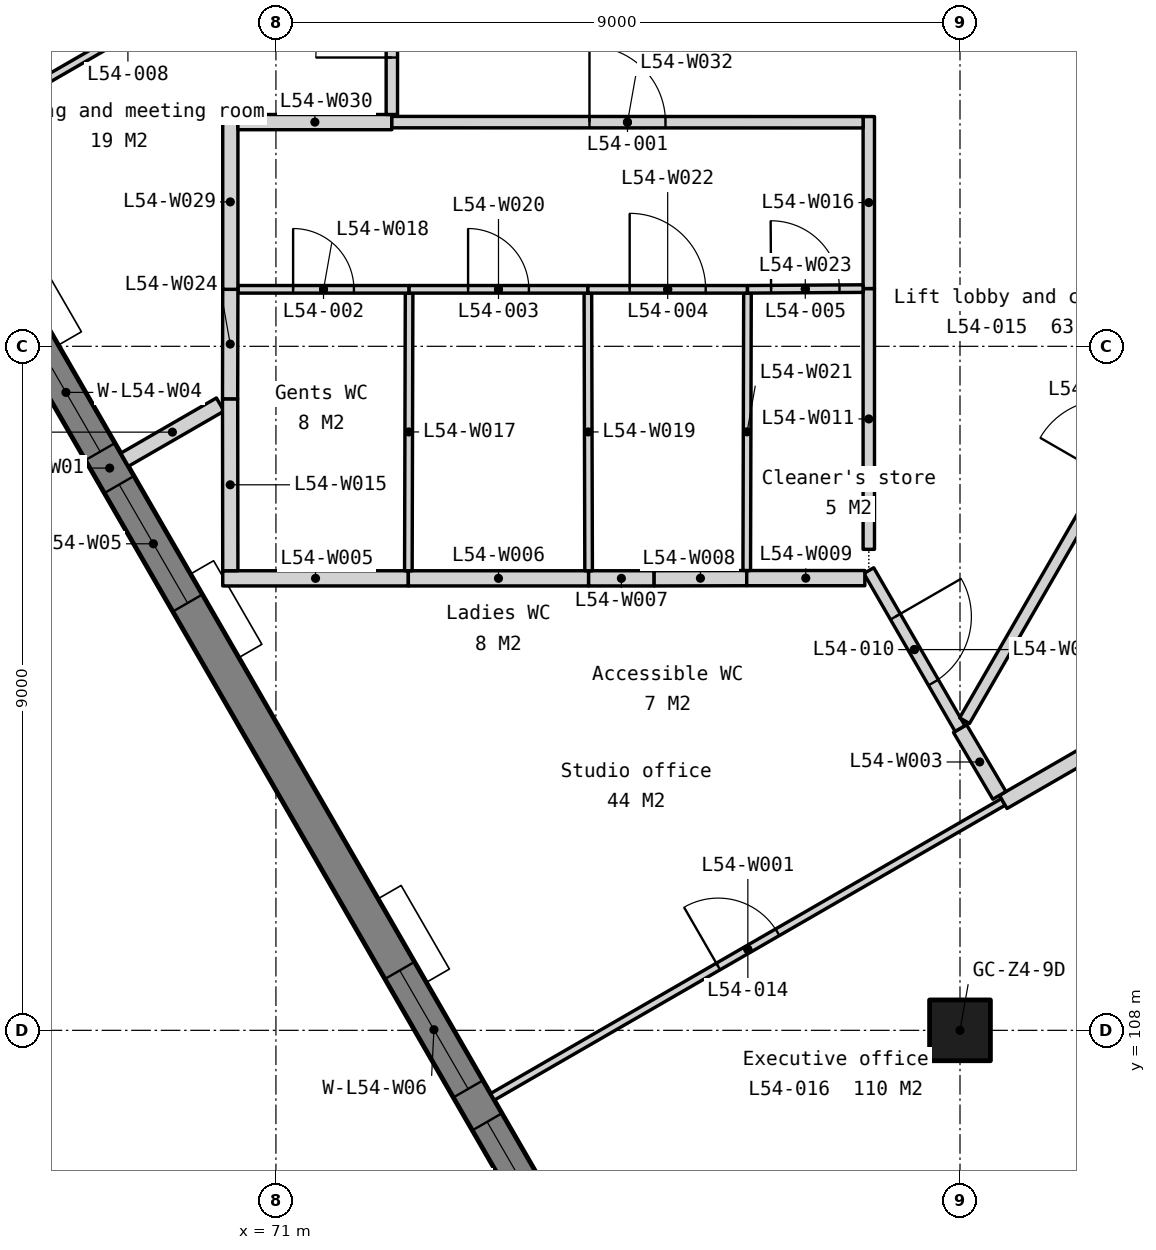
"""IFC4 building model, lengths in metres.
Left out: names, types, materials, properties, quantities, classifications, styles, units other than length and angle.
Written with IfcOpenShell. Run it as: python <this file> out.ifc"""

import sys

from ifc_helpers import new_model, si_unit, direction, frame, frame_2d, origin, origin_2d, place, context, subcontext, project, spatial, polyline, rectangle, outline, extrude, element, fill, save


model = new_model("IFC4")
c1 = context("Model", 3, precision=1e-05, world=origin(), true_north=direction((0.0, 1.0)))
c2 = subcontext(c1, "Body", "Model", "MODEL_VIEW")
j1 = project(units=[si_unit("LENGTHUNIT", "METRE"), si_unit("PLANEANGLEUNIT", "RADIAN")], contexts=[c1])
p1 = place(None, origin())
s1 = spatial("IfcSite", under=j1, at=p1, CompositionType="ELEMENT")
p2 = place(p1, origin())
s2 = spatial("IfcBuilding", under=s1, at=p2, CompositionType="ELEMENT")
p3 = place(p2, frame((0.0, 0.0, 215.3)))
s3 = spatial("IfcBuildingStorey", under=s2, at=p3, CompositionType="ELEMENT", Elevation=215.3)
p4 = place(p3, frame((80.0, 108.0, 0.0), z_axis=(0.0, 0.0, 1.0), x_axis=(1.0, 0.0, 0.0)))
e1 = element("IfcColumn", 1, at=p4, inside=s3, PredefinedType="COLUMN", context=c2, shape_type="SweptSolid", body=[
    extrude(rectangle(XDim=0.8, YDim=0.8, at=origin_2d()), origin(), (0.0, 0.0, 1.0), 3.9),
])
p5 = place(p3, frame((59.13, 132.168, -0.15), z_axis=(0.0, 0.0, 1.0), x_axis=(0.500002199942, -0.866024133644, 0.0)))
e2 = element("IfcWall", 2, at=p5, inside=s3, PredefinedType="SOLIDWALL", context=c2, shape_type="SweptSolid", body=[
    extrude(outline(polyline([(38.729, 0.0), (38.729, 3.9), (0.0, 3.9), (0.0, 0.0), (38.729, 0.0)])), frame((0.0, 0.225, 0.0), z_axis=(0.0, -1.0, 0.0), x_axis=(1.0, 0.0, 0.0)), (0.0, 0.0, 1.0), 0.45),
])
p6 = place(p5, frame((0.776, 0.0, 0.95)))
e3 = element("IfcOpeningElement", 3, at=p6, cuts=e2, PredefinedType="OPENING", context=c2, shape_type="SweptSolid", body=[
    extrude(rectangle(XDim=1.2, YDim=2.2, at=frame_2d((0.6, 1.1))), frame((0.0, 0.235, 0.0), z_axis=(0.0, -1.0, 0.0), x_axis=(1.0, 0.0, 0.0)), (0.0, 0.0, 1.0), 0.47),
])
p7 = place(p5, frame((7.632, 0.0, 0.95)))
e4 = element("IfcOpeningElement", 4, at=p7, cuts=e2, PredefinedType="OPENING", context=c2, shape_type="SweptSolid", body=[
    extrude(rectangle(XDim=1.8, YDim=2.2, at=frame_2d((0.9, 1.1))), frame((0.0, 0.235, 0.0), z_axis=(0.0, -1.0, 0.0), x_axis=(1.0, 0.0, 0.0)), (0.0, 0.0, 1.0), 0.47),
])
p8 = place(p5, frame((9.932, 0.0, 0.95)))
e5 = element("IfcOpeningElement", 5, at=p8, cuts=e2, PredefinedType="OPENING", context=c2, shape_type="SweptSolid", body=[
    extrude(rectangle(XDim=1.8, YDim=2.2, at=frame_2d((0.9, 1.1))), frame((0.0, 0.235, 0.0), z_axis=(0.0, -1.0, 0.0), x_axis=(1.0, 0.0, 0.0)), (0.0, 0.0, 1.0), 0.47),
])
p9 = place(p5, frame((17.315, 0.0, 0.95)))
e6 = element("IfcOpeningElement", 6, at=p9, cuts=e2, PredefinedType="OPENING", context=c2, shape_type="SweptSolid", body=[
    extrude(rectangle(XDim=1.8, YDim=2.2, at=frame_2d((0.9, 1.1))), frame((0.0, 0.235, 0.0), z_axis=(0.0, -1.0, 0.0), x_axis=(1.0, 0.0, 0.0)), (0.0, 0.0, 1.0), 0.47),
])
p10 = place(p5, frame((19.615, 0.0, 0.95)))
e7 = element("IfcOpeningElement", 7, at=p10, cuts=e2, PredefinedType="OPENING", context=c2, shape_type="SweptSolid", body=[
    extrude(rectangle(XDim=1.8, YDim=2.2, at=frame_2d((0.9, 1.1))), frame((0.0, 0.235, 0.0), z_axis=(0.0, -1.0, 0.0), x_axis=(1.0, 0.0, 0.0)), (0.0, 0.0, 1.0), 0.47),
])
p11 = place(p5, frame((26.997, 0.0, 0.95)))
e8 = element("IfcOpeningElement", 8, at=p11, cuts=e2, PredefinedType="OPENING", context=c2, shape_type="SweptSolid", body=[
    extrude(rectangle(XDim=1.8, YDim=2.2, at=frame_2d((0.9, 1.1))), frame((0.0, 0.235, 0.0), z_axis=(0.0, -1.0, 0.0), x_axis=(1.0, 0.0, 0.0)), (0.0, 0.0, 1.0), 0.47),
])
p12 = place(p5, frame((29.297, 0.0, 0.95)))
e9 = element("IfcOpeningElement", 9, at=p12, cuts=e2, PredefinedType="OPENING", context=c2, shape_type="SweptSolid", body=[
    extrude(rectangle(XDim=1.8, YDim=2.2, at=frame_2d((0.9, 1.1))), frame((0.0, 0.235, 0.0), z_axis=(0.0, -1.0, 0.0), x_axis=(1.0, 0.0, 0.0)), (0.0, 0.0, 1.0), 0.47),
])
p13 = place(p5, frame((36.753, 0.0, 0.95)))
e10 = element("IfcOpeningElement", 10, at=p13, cuts=e2, PredefinedType="OPENING", context=c2, shape_type="SweptSolid", body=[
    extrude(rectangle(XDim=1.2, YDim=2.2, at=frame_2d((0.6, 1.1))), frame((0.0, 0.235, 0.0), z_axis=(0.0, -1.0, 0.0), x_axis=(1.0, 0.0, 0.0)), (0.0, 0.0, 1.0), 0.47),
])
p14 = place(p3, frame((73.849, 107.125, 0.0), z_axis=(0.0, 0.0, 1.0), x_axis=(0.866027358884, 0.499996613652, 0.0)))
e11 = element("IfcWall", 11, at=p14, inside=s3, PredefinedType="PARTITIONING", context=c2, shape_type="SweptSolid", body=[
    extrude(rectangle(XDim=7.76, YDim=0.1, at=frame_2d((3.88, 0.0))), origin(), (0.0, 0.0, 1.0), 3.75),
])
p15 = place(p14, frame((3.43, 0.0, 0.0)))
e12 = element("IfcOpeningElement", 12, at=p15, cuts=e11, PredefinedType="OPENING", context=c2, shape_type="SweptSolid", body=[
    extrude(rectangle(XDim=0.9, YDim=2.1, at=frame_2d((0.45, 1.05))), frame((0.0, 0.06, 0.0), z_axis=(0.0, -1.0, 0.0), x_axis=(1.0, 0.0, 0.0)), (0.0, 0.0, 1.0), 0.12),
])
p16 = place(p3, frame((80.569, 111.005, 0.0), z_axis=(0.0, 0.0, 1.0), x_axis=(0.866025130863, 0.500000472714, 0.0)))
e13 = element("IfcWall", 13, at=p16, inside=s3, PredefinedType="PARTITIONING", context=c2, shape_type="SweptSolid", body=[
    extrude(rectangle(XDim=10.363, YDim=0.2, at=frame_2d((5.182, 0.0))), origin(), (0.0, 0.0, 1.0), 3.75),
])
p17 = place(p3, frame((80.0, 111.97, 0.0), z_axis=(0.0, 0.0, 1.0), x_axis=(0.507689136561, -0.861540330233, 0.0)))
e14 = element("IfcWall", 14, at=p17, inside=s3, PredefinedType="PARTITIONING", context=c2, shape_type="SweptSolid", body=[
    extrude(rectangle(XDim=1.021, YDim=0.2, at=frame_2d((0.51, 0.0))), origin(), (0.0, 0.0, 1.0), 3.75),
])
p18 = place(p3, frame((78.8, 114.049, 0.0), z_axis=(0.0, 0.0, 1.0), x_axis=(0.500001309137, -0.866024647952, 0.0)))
e15 = element("IfcWall", 15, at=p18, inside=s3, PredefinedType="PARTITIONING", context=c2, shape_type="SweptSolid", body=[
    extrude(rectangle(XDim=2.4, YDim=0.15, at=frame_2d((1.2, 0.0))), origin(), (0.0, 0.0, 1.0), 3.75),
])
p19 = place(p18, frame((0.7, 0.0, 0.0)))
e16 = element("IfcOpeningElement", 16, at=p19, cuts=e15, PredefinedType="OPENING", context=c2, shape_type="SweptSolid", body=[
    extrude(rectangle(XDim=1.0, YDim=2.1, at=frame_2d((0.5, 1.05))), frame((0.0, 0.085, 0.0), z_axis=(0.0, -1.0, 0.0), x_axis=(1.0, 0.0, 0.0)), (0.0, 0.0, 1.0), 0.17),
])
p20 = place(p3, frame((70.3, 113.947, 0.0), z_axis=(0.0, 0.0, 1.0), x_axis=(1.0, 0.0, 0.0)))
e17 = element("IfcWall", 17, at=p20, inside=s3, PredefinedType="PARTITIONING", context=c2, shape_type="SweptSolid", body=[
    extrude(rectangle(XDim=2.442, YDim=0.2, at=frame_2d((1.221, 0.0))), origin(), (0.0, 0.0, 1.0), 3.75),
])
p21 = place(p3, frame((72.742, 113.947, 0.0), z_axis=(0.0, 0.0, 1.0), x_axis=(1.0, 0.0, 0.0)))
e18 = element("IfcWall", 18, at=p21, inside=s3, PredefinedType="PARTITIONING", context=c2, shape_type="SweptSolid", body=[
    extrude(rectangle(XDim=2.372, YDim=0.2, at=frame_2d((1.186, 0.0))), origin(), (0.0, 0.0, 1.0), 3.75),
])
p22 = place(p3, frame((75.114, 113.947, 0.0), z_axis=(0.0, 0.0, 1.0), x_axis=(1.0, 0.0, 0.0)))
e19 = element("IfcWall", 19, at=p22, inside=s3, PredefinedType="PARTITIONING", context=c2, shape_type="SweptSolid", body=[
    extrude(rectangle(XDim=0.862, YDim=0.2, at=frame_2d((0.431, 0.0))), origin(), (0.0, 0.0, 1.0), 3.75),
])
p23 = place(p3, frame((75.976, 113.947, 0.0), z_axis=(0.0, 0.0, 1.0), x_axis=(0.999997107299, 0.002405284684, 0.0)))
e20 = element("IfcWall", 20, at=p23, inside=s3, PredefinedType="PARTITIONING", context=c2, shape_type="SweptSolid", body=[
    extrude(rectangle(XDim=1.218, YDim=0.2, at=frame_2d((0.609, 0.0))), origin(), (0.0, 0.0, 1.0), 3.75),
])
p24 = place(p3, frame((77.194, 113.95, 0.0), z_axis=(0.0, 0.0, 1.0), x_axis=(1.0, 0.0, 0.0)))
e21 = element("IfcWall", 21, at=p24, inside=s3, PredefinedType="PARTITIONING", context=c2, shape_type="SweptSolid", body=[
    extrude(rectangle(XDim=1.554, YDim=0.2, at=frame_2d((0.777, 0.0))), origin(), (0.0, 0.0, 1.0), 3.75),
])
p25 = place(p3, frame((78.8, 114.329, 0.0), z_axis=(0.0, 0.0, 1.0), x_axis=(0.0, 1.0, 0.0)))
e22 = element("IfcWall", 22, at=p25, inside=s3, PredefinedType="PARTITIONING", context=c2, shape_type="SweptSolid", body=[
    extrude(rectangle(XDim=3.431, YDim=0.15, at=frame_2d((1.716, 0.0))), origin(), (0.0, 0.0, 1.0), 3.75),
])
p26 = place(p3, frame((69.009, 115.508, 0.0), z_axis=(0.0, 0.0, 1.0), x_axis=(0.865958882005, 0.500115201406, 0.0)))
e23 = element("IfcWall", 23, at=p26, inside=s3, PredefinedType="PARTITIONING", context=c2, shape_type="SweptSolid", body=[
    extrude(rectangle(XDim=1.453, YDim=0.2, at=frame_2d((0.727, 0.0))), origin(), (0.0, 0.0, 1.0), 3.75),
])
p27 = place(p3, frame((70.4, 114.047, 0.0), z_axis=(0.0, 0.0, 1.0), x_axis=(-0.001295195892, 0.999999161233, 0.0)))
e24 = element("IfcWall", 24, at=p27, inside=s3, PredefinedType="PARTITIONING", context=c2, shape_type="SweptSolid", body=[
    extrude(rectangle(XDim=2.262, YDim=0.2, at=frame_2d((1.131, 0.0))), origin(), (0.0, 0.0, 1.0), 3.75),
])
p28 = place(p3, frame((78.8, 117.76, 0.0), z_axis=(0.0, 0.0, 1.0), x_axis=(0.0, 1.0, 0.0)))
e25 = element("IfcWall", 25, at=p28, inside=s3, PredefinedType="PARTITIONING", context=c2, shape_type="SweptSolid", body=[
    extrude(rectangle(XDim=2.263, YDim=0.15, at=frame_2d((1.131, 0.0))), origin(), (0.0, 0.0, 1.0), 3.75),
])
p29 = place(p3, frame((72.742, 114.047, 0.0), z_axis=(0.0, 0.0, 1.0), x_axis=(0.002673429826, 0.99999642638, 0.0)))
e26 = element("IfcWall", 26, at=p29, inside=s3, PredefinedType="PARTITIONING", context=c2, shape_type="SweptSolid", body=[
    extrude(rectangle(XDim=3.653, YDim=0.1, at=frame_2d((1.826, 0.0))), origin(), (0.0, 0.0, 1.0), 3.75),
])
p30 = place(p3, frame((70.5, 117.75, 0.0), z_axis=(0.0, 0.0, 1.0), x_axis=(1.0, 0.0, 0.0)))
e27 = element("IfcWall", 27, at=p30, inside=s3, PredefinedType="PARTITIONING", context=c2, shape_type="SweptSolid", body=[
    extrude(rectangle(XDim=2.252, YDim=0.1, at=frame_2d((1.126, 0.0))), origin(), (0.0, 0.0, 1.0), 3.75),
])
p31 = place(p30, frame((0.726, 0.0, 0.0)))
e28 = element("IfcOpeningElement", 28, at=p31, cuts=e27, PredefinedType="OPENING", context=c2, shape_type="SweptSolid", body=[
    extrude(rectangle(XDim=0.8, YDim=2.1, at=frame_2d((0.4, 1.05))), frame((0.0, 0.06, 0.0), z_axis=(0.0, -1.0, 0.0), x_axis=(1.0, 0.0, 0.0)), (0.0, 0.0, 1.0), 0.12),
])
p32 = place(p3, frame((75.114, 114.047, 0.0), z_axis=(0.0, 0.0, 1.0), x_axis=(-0.00260659454, 0.999996602827, 0.0)))
e29 = element("IfcWall", 29, at=p32, inside=s3, PredefinedType="PARTITIONING", context=c2, shape_type="SweptSolid", body=[
    extrude(rectangle(XDim=3.653, YDim=0.1, at=frame_2d((1.826, 0.0))), origin(), (0.0, 0.0, 1.0), 3.75),
])
p33 = place(p3, frame((72.752, 117.75, 0.0), z_axis=(0.0, 0.0, 1.0), x_axis=(1.0, 0.0, 0.0)))
e30 = element("IfcWall", 30, at=p33, inside=s3, PredefinedType="PARTITIONING", context=c2, shape_type="SweptSolid", body=[
    extrude(rectangle(XDim=2.352, YDim=0.1, at=frame_2d((1.176, 0.0))), origin(), (0.0, 0.0, 1.0), 3.75),
])
p34 = place(p33, frame((0.776, 0.0, 0.0)))
e31 = element("IfcOpeningElement", 31, at=p34, cuts=e30, PredefinedType="OPENING", context=c2, shape_type="SweptSolid", body=[
    extrude(rectangle(XDim=0.8, YDim=2.1, at=frame_2d((0.4, 1.05))), frame((0.0, 0.06, 0.0), z_axis=(0.0, -1.0, 0.0), x_axis=(1.0, 0.0, 0.0)), (0.0, 0.0, 1.0), 0.12),
])
p35 = place(p3, frame((77.194, 114.05, 0.0), z_axis=(0.0, 0.0, 1.0), x_axis=(0.002608686776, 0.999996597371, 0.0)))
e32 = element("IfcWall", 32, at=p35, inside=s3, PredefinedType="PARTITIONING", context=c2, shape_type="SweptSolid", body=[
    extrude(rectangle(XDim=3.65, YDim=0.1, at=frame_2d((1.825, 0.0))), origin(), (0.0, 0.0, 1.0), 3.75),
])
p36 = place(p3, frame((75.104, 117.75, 0.0), z_axis=(0.0, 0.0, 1.0), x_axis=(1.0, 0.0, 0.0)))
e33 = element("IfcWall", 33, at=p36, inside=s3, PredefinedType="PARTITIONING", context=c2, shape_type="SweptSolid", body=[
    extrude(rectangle(XDim=2.1, YDim=0.1, at=frame_2d((1.05, 0.0))), origin(), (0.0, 0.0, 1.0), 3.75),
])
p37 = place(p36, frame((0.55, 0.0, 0.0)))
e34 = element("IfcOpeningElement", 34, at=p37, cuts=e33, PredefinedType="OPENING", context=c2, shape_type="SweptSolid", body=[
    extrude(rectangle(XDim=1.0, YDim=2.1, at=frame_2d((0.5, 1.05))), frame((0.0, 0.06, 0.0), z_axis=(0.0, -1.0, 0.0), x_axis=(1.0, 0.0, 0.0)), (0.0, 0.0, 1.0), 0.12),
])
p38 = place(p3, frame((77.204, 117.75, 0.0), z_axis=(0.0, 0.0, 1.0), x_axis=(0.999980406575, 0.006259909447, 0.0)))
e35 = element("IfcWall", 35, at=p38, inside=s3, PredefinedType="PARTITIONING", context=c2, shape_type="SweptSolid", body=[
    extrude(rectangle(XDim=1.521, YDim=0.1, at=frame_2d((0.76, 0.0))), origin(), (0.0, 0.0, 1.0), 3.75),
])
p39 = place(p38, frame((0.311, 0.0, 0.0)))
e36 = element("IfcOpeningElement", 36, at=p39, cuts=e35, PredefinedType="OPENING", context=c2, shape_type="SweptSolid", body=[
    extrude(rectangle(XDim=0.9, YDim=2.1, at=frame_2d((0.45, 1.05))), frame((0.0, 0.06, 0.0), z_axis=(0.0, -1.0, 0.0), x_axis=(1.0, 0.0, 0.0)), (0.0, 0.0, 1.0), 0.12),
])
p40 = place(p3, frame((70.397, 116.309, 0.0), z_axis=(0.0, 0.0, 1.0), x_axis=(0.002033204879, 0.999997933037, 0.0)))
e37 = element("IfcWall", 37, at=p40, inside=s3, PredefinedType="PARTITIONING", context=c2, shape_type="SweptSolid", body=[
    extrude(rectangle(XDim=1.441, YDim=0.2, at=frame_2d((0.72, 0.0))), origin(), (0.0, 0.0, 1.0), 3.75),
])
p41 = place(p3, frame((80.06, 112.074, 0.0), z_axis=(0.0, 0.0, 1.0), x_axis=(0.500005339912, 0.866022320763, 0.0)))
e38 = element("IfcWall", 38, at=p41, inside=s3, PredefinedType="PARTITIONING", context=c2, shape_type="SweptSolid", body=[
    extrude(rectangle(XDim=8.442, YDim=0.15, at=frame_2d((4.221, 0.0))), origin(), (0.0, 0.0, 1.0), 3.75),
])
p42 = place(p41, frame((3.721, 0.0, 0.0)))
e39 = element("IfcOpeningElement", 39, at=p42, cuts=e38, PredefinedType="OPENING", context=c2, shape_type="SweptSolid", body=[
    extrude(rectangle(XDim=1.0, YDim=2.1, at=frame_2d((0.5, 1.05))), frame((0.0, 0.085, 0.0), z_axis=(0.0, -1.0, 0.0), x_axis=(1.0, 0.0, 0.0)), (0.0, 0.0, 1.0), 0.17),
])
p43 = place(p3, frame((66.587, 119.703, 0.0), z_axis=(0.0, 0.0, 1.0), x_axis=(0.866023511746, 0.500003277092, 0.0)))
e40 = element("IfcWall", 40, at=p43, inside=s3, PredefinedType="PARTITIONING", context=c2, shape_type="SweptSolid", body=[
    extrude(rectangle(XDim=5.694, YDim=0.1, at=frame_2d((2.847, 0.0))), origin(), (0.0, 0.0, 1.0), 3.75),
])
p44 = place(p43, frame((2.397, 0.0, 0.0)))
e41 = element("IfcOpeningElement", 41, at=p44, cuts=e40, PredefinedType="OPENING", context=c2, shape_type="SweptSolid", body=[
    extrude(rectangle(XDim=0.9, YDim=2.1, at=frame_2d((0.45, 1.05))), frame((0.0, 0.06, 0.0), z_axis=(0.0, -1.0, 0.0), x_axis=(1.0, 0.0, 0.0)), (0.0, 0.0, 1.0), 0.12),
])
p45 = place(p3, frame((70.4, 117.75, 0.0), z_axis=(0.0, 0.0, 1.0), x_axis=(0.0, 1.0, 0.0)))
e42 = element("IfcWall", 42, at=p45, inside=s3, PredefinedType="PARTITIONING", context=c2, shape_type="SweptSolid", body=[
    extrude(rectangle(XDim=2.3, YDim=0.2, at=frame_2d((1.15, 0.0))), origin(), (0.0, 0.0, 1.0), 3.75),
])
p46 = place(p3, frame((70.5, 119.95, 0.0), z_axis=(0.0, 0.0, 1.0), x_axis=(1.0, 0.0, 0.0)))
e43 = element("IfcWall", 43, at=p46, inside=s3, PredefinedType="PARTITIONING", context=c2, shape_type="SweptSolid", body=[
    extrude(rectangle(XDim=2.025, YDim=0.2, at=frame_2d((1.012, 0.0))), origin(), (0.0, 0.0, 1.0), 3.75),
])
p47 = place(p3, frame((72.525, 120.05, 0.0), z_axis=(0.0, 0.0, 1.0), x_axis=(0.0, 1.0, 0.0)))
e44 = element("IfcWall", 44, at=p47, inside=s3, PredefinedType="PARTITIONING", context=c2, shape_type="SweptSolid", body=[
    extrude(rectangle(XDim=2.5, YDim=0.15, at=frame_2d((1.25, 0.0))), origin(), (0.0, 0.0, 1.0), 3.75),
])
p48 = place(p47, frame((0.75, 0.0, 0.0)))
e45 = element("IfcOpeningElement", 45, at=p48, cuts=e44, PredefinedType="OPENING", context=c2, shape_type="SweptSolid", body=[
    extrude(rectangle(XDim=1.0, YDim=2.1, at=frame_2d((0.5, 1.05))), frame((0.0, 0.085, 0.0), z_axis=(0.0, -1.0, 0.0), x_axis=(1.0, 0.0, 0.0)), (0.0, 0.0, 1.0), 0.17),
])
p49 = place(p3, frame((72.525, 119.95, 0.0), z_axis=(0.0, 0.0, 1.0), x_axis=(0.999999950384, -0.000315010222, 0.0)))
e46 = element("IfcWall", 46, at=p49, inside=s3, PredefinedType="PARTITIONING", context=c2, shape_type="SweptSolid", body=[
    extrude(rectangle(XDim=6.2, YDim=0.15, at=frame_2d((3.1, 0.0))), origin(), (0.0, 0.0, 1.0), 3.75),
])
p50 = place(p49, frame((2.6, 0.0, 0.0)))
e47 = element("IfcOpeningElement", 47, at=p50, cuts=e46, PredefinedType="OPENING", context=c2, shape_type="SweptSolid", body=[
    extrude(rectangle(XDim=1.0, YDim=2.1, at=frame_2d((0.5, 1.05))), frame((0.0, 0.085, 0.0), z_axis=(0.0, -1.0, 0.0), x_axis=(1.0, 0.0, 0.0)), (0.0, 0.0, 1.0), 0.17),
])
p51 = place(p9, origin())
e48 = element("IfcWindow", 48, at=p51, inside=s3, PartitioningType="SINGLE_PANEL", PredefinedType="WINDOW", context=c2, shape_type="SweptSolid", body=[
    extrude(rectangle(XDim=1.8, YDim=2.2, at=frame_2d((0.9, 1.1))), frame((0.0, 0.03, 0.0), z_axis=(0.0, -1.0, 0.0), x_axis=(1.0, 0.0, 0.0)), (0.0, 0.0, 1.0), 0.06),
])
fill(e6, e48)
p52 = place(p10, origin())
e49 = element("IfcWindow", 49, at=p52, inside=s3, PartitioningType="SINGLE_PANEL", PredefinedType="WINDOW", context=c2, shape_type="SweptSolid", body=[
    extrude(rectangle(XDim=1.8, YDim=2.2, at=frame_2d((0.9, 1.1))), frame((0.0, 0.03, 0.0), z_axis=(0.0, -1.0, 0.0), x_axis=(1.0, 0.0, 0.0)), (0.0, 0.0, 1.0), 0.06),
])
fill(e7, e49)
p53 = place(p11, origin())
e50 = element("IfcWindow", 50, at=p53, inside=s3, PartitioningType="SINGLE_PANEL", PredefinedType="WINDOW", context=c2, shape_type="SweptSolid", body=[
    extrude(rectangle(XDim=1.8, YDim=2.2, at=frame_2d((0.9, 1.1))), frame((0.0, 0.03, 0.0), z_axis=(0.0, -1.0, 0.0), x_axis=(1.0, 0.0, 0.0)), (0.0, 0.0, 1.0), 0.06),
])
fill(e8, e50)
p54 = place(p12, origin())
e51 = element("IfcWindow", 51, at=p54, inside=s3, PartitioningType="SINGLE_PANEL", PredefinedType="WINDOW", context=c2, shape_type="SweptSolid", body=[
    extrude(rectangle(XDim=1.8, YDim=2.2, at=frame_2d((0.9, 1.1))), frame((0.0, 0.03, 0.0), z_axis=(0.0, -1.0, 0.0), x_axis=(1.0, 0.0, 0.0)), (0.0, 0.0, 1.0), 0.06),
])
fill(e9, e51)
p55 = place(p50, origin())
e52 = element("IfcDoor", 52, at=p55, inside=s3, OperationType="SINGLE_SWING_LEFT", PredefinedType="DOOR", context=c2, shape_type="SweptSolid", body=[
    extrude(rectangle(XDim=1.0, YDim=2.1, at=frame_2d((0.5, 1.05))), frame((0.0, 0.025, 0.0), z_axis=(0.0, -1.0, 0.0), x_axis=(1.0, 0.0, 0.0)), (0.0, 0.0, 1.0), 0.05),
])
fill(e47, e52)
p56 = place(p31, origin())
e53 = element("IfcDoor", 53, at=p56, inside=s3, OperationType="SINGLE_SWING_LEFT", PredefinedType="DOOR", context=c2, shape_type="SweptSolid", body=[
    extrude(rectangle(XDim=0.8, YDim=2.1, at=frame_2d((0.4, 1.05))), frame((0.0, 0.025, 0.0), z_axis=(0.0, -1.0, 0.0), x_axis=(1.0, 0.0, 0.0)), (0.0, 0.0, 1.0), 0.05),
])
fill(e28, e53)
p57 = place(p34, origin())
e54 = element("IfcDoor", 54, at=p57, inside=s3, OperationType="SINGLE_SWING_LEFT", PredefinedType="DOOR", context=c2, shape_type="SweptSolid", body=[
    extrude(rectangle(XDim=0.8, YDim=2.1, at=frame_2d((0.4, 1.05))), frame((0.0, 0.025, 0.0), z_axis=(0.0, -1.0, 0.0), x_axis=(1.0, 0.0, 0.0)), (0.0, 0.0, 1.0), 0.05),
])
fill(e31, e54)
p58 = place(p37, origin())
e55 = element("IfcDoor", 55, at=p58, inside=s3, OperationType="SINGLE_SWING_LEFT", PredefinedType="DOOR", context=c2, shape_type="SweptSolid", body=[
    extrude(rectangle(XDim=1.0, YDim=2.1, at=frame_2d((0.5, 1.05))), frame((0.0, 0.025, 0.0), z_axis=(0.0, -1.0, 0.0), x_axis=(1.0, 0.0, 0.0)), (0.0, 0.0, 1.0), 0.05),
])
fill(e34, e55)
p59 = place(p39, origin())
e56 = element("IfcDoor", 56, at=p59, inside=s3, OperationType="SINGLE_SWING_LEFT", PredefinedType="DOOR", context=c2, shape_type="SweptSolid", body=[
    extrude(rectangle(XDim=0.9, YDim=2.1, at=frame_2d((0.45, 1.05))), frame((0.0, 0.025, 0.0), z_axis=(0.0, -1.0, 0.0), x_axis=(1.0, 0.0, 0.0)), (0.0, 0.0, 1.0), 0.05),
])
fill(e36, e56)
p60 = place(p48, origin())
e57 = element("IfcDoor", 57, at=p60, inside=s3, OperationType="SINGLE_SWING_LEFT", PredefinedType="DOOR", context=c2, shape_type="SweptSolid", body=[
    extrude(rectangle(XDim=1.0, YDim=2.1, at=frame_2d((0.5, 1.05))), frame((0.0, 0.025, 0.0), z_axis=(0.0, -1.0, 0.0), x_axis=(1.0, 0.0, 0.0)), (0.0, 0.0, 1.0), 0.05),
])
fill(e45, e57)
p61 = place(p19, origin())
e58 = element("IfcDoor", 58, at=p61, inside=s3, OperationType="SINGLE_SWING_LEFT", PredefinedType="DOOR", context=c2, shape_type="SweptSolid", body=[
    extrude(rectangle(XDim=1.0, YDim=2.1, at=frame_2d((0.5, 1.05))), frame((0.0, 0.025, 0.0), z_axis=(0.0, -1.0, 0.0), x_axis=(1.0, 0.0, 0.0)), (0.0, 0.0, 1.0), 0.05),
])
fill(e16, e58)
p62 = place(p15, origin())
e59 = element("IfcDoor", 59, at=p62, inside=s3, OperationType="SINGLE_SWING_LEFT", PredefinedType="DOOR", context=c2, shape_type="SweptSolid", body=[
    extrude(rectangle(XDim=0.9, YDim=2.1, at=frame_2d((0.45, 1.05))), frame((0.0, 0.025, 0.0), z_axis=(0.0, -1.0, 0.0), x_axis=(1.0, 0.0, 0.0)), (0.0, 0.0, 1.0), 0.05),
])
fill(e12, e59)
save(model, sys.argv[1])
